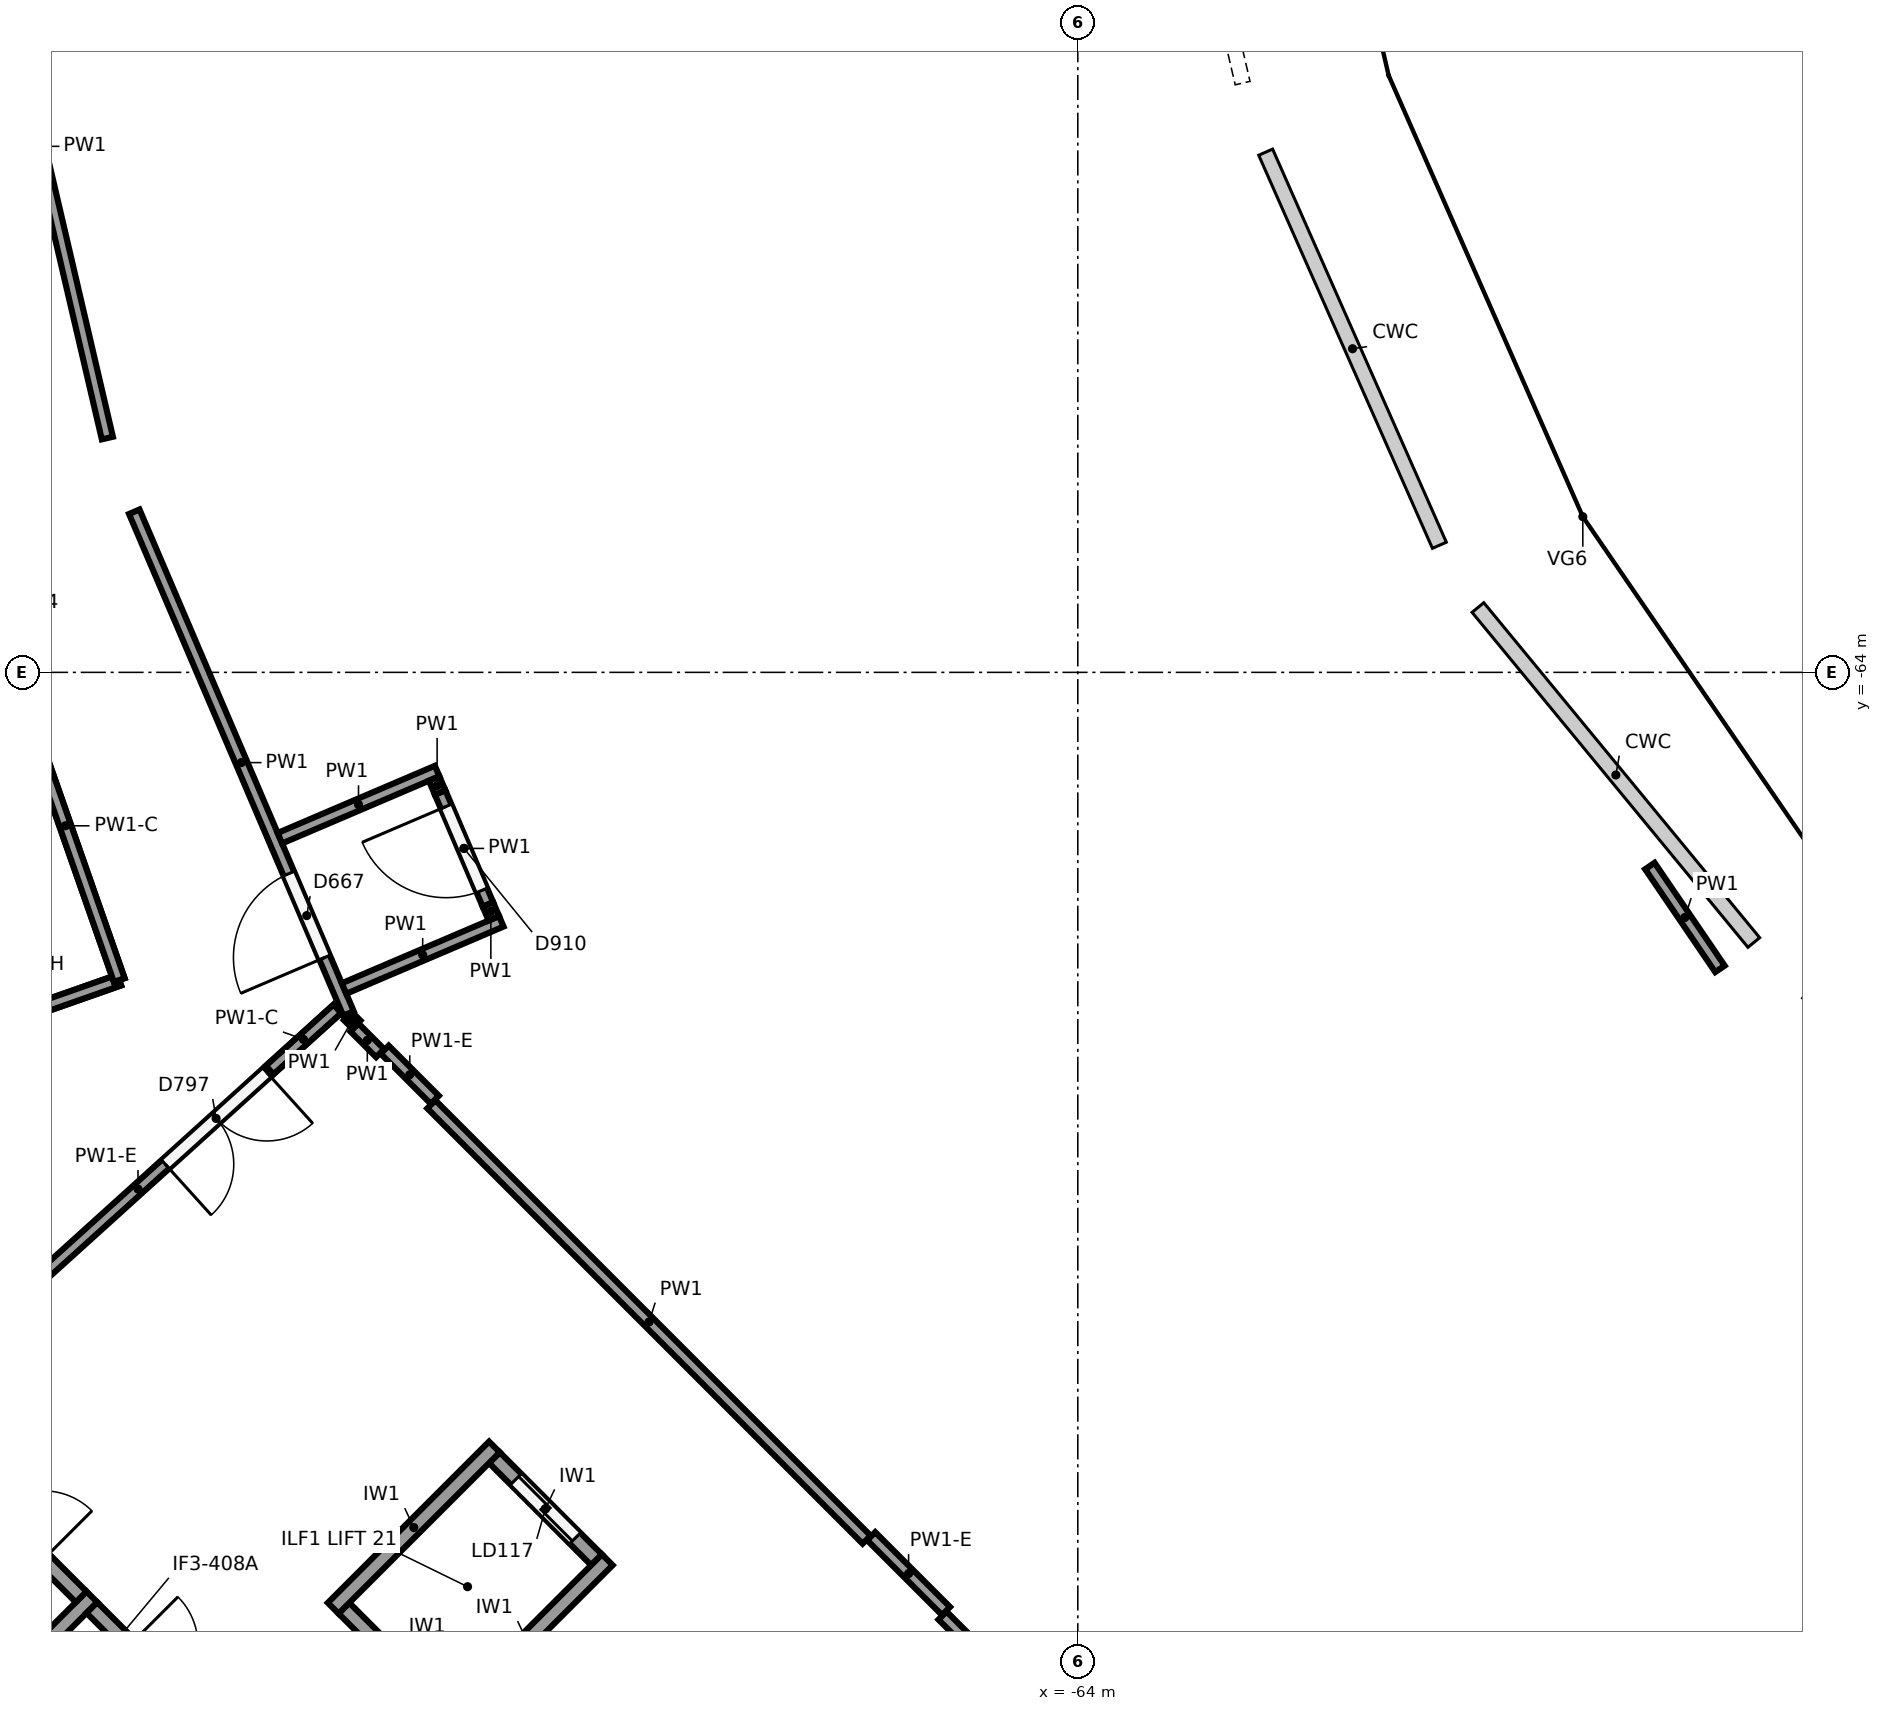
"""IFC4 building model, lengths in metres.
Left out: names, types, materials, properties, quantities, classifications, styles, units other than length and angle.
Written with IfcOpenShell. Run it as: python <this file> out.ifc"""

import sys

from ifc_helpers import new_model, si_unit, direction, frame, frame_2d, origin, origin_2d, place, context, subcontext, project, spatial, rectangle, circle, extrude, element, fill, save


model = new_model("IFC4")
c1 = context("Model", 3, precision=1e-05, world=origin(), true_north=direction((0.0, 1.0)))
c2 = subcontext(c1, "Body", "Model", "MODEL_VIEW")
j1 = project(units=[si_unit("LENGTHUNIT", "METRE"), si_unit("PLANEANGLEUNIT", "RADIAN")], contexts=[c1])
p1 = place(None, origin())
s1 = spatial("IfcSite", under=j1, at=p1, CompositionType="ELEMENT")
p2 = place(p1, origin())
s2 = spatial("IfcBuilding", under=s1, at=p2, CompositionType="ELEMENT")
p3 = place(p2, frame((0.0, 0.0, 6.5)))
s3 = spatial("IfcBuildingStorey", under=s2, at=p3, CompositionType="ELEMENT", Elevation=6.5)
p4 = place(p3, frame((-61.723, -56.716, 0.0), z_axis=(0.0, 0.0, 1.0), x_axis=(1.0, 0.0, 0.0)))
e1 = element("IfcColumn", 1, at=p4, inside=s3, PredefinedType="COLUMN", context=c2, shape_type="SweptSolid", body=[
    extrude(circle(Radius=0.45, at=origin_2d()), origin(), (0.0, 0.0, 1.0), 5.5),
])
p5 = place(p3, frame((-62.964, -57.104, 0.0), z_axis=(0.0, 0.0, 1.0), x_axis=(1.0, 0.0, 0.0)))
e2 = element("IfcColumn", 2, at=p5, inside=s3, PredefinedType="COLUMN", context=c2, shape_type="SweptSolid", body=[
    extrude(circle(Radius=0.4, at=origin_2d()), origin(), (0.0, 0.0, 1.0), 5.5),
])
p6 = place(p3, frame((-71.17, -59.677, 0.0), z_axis=(0.0, 0.0, 1.0), x_axis=(1.0, 0.0, 0.0)))
e3 = element("IfcColumn", 3, at=p6, inside=s3, PredefinedType="COLUMN", context=c2, shape_type="SweptSolid", body=[
    extrude(circle(Radius=0.45, at=origin_2d()), origin(), (0.0, 0.0, 1.0), 5.5),
])
p7 = place(p3, frame((-54.364, -60.513, 0.0), z_axis=(0.0, 0.0, 1.0), x_axis=(1.0, 0.0, 0.0)))
e4 = element("IfcColumn", 4, at=p7, inside=s3, PredefinedType="COLUMN", context=c2, shape_type="SweptSolid", body=[
    extrude(circle(Radius=0.45, at=origin_2d()), origin(), (0.0, 0.0, 1.0), 5.392),
])
p8 = place(p3, frame((-59.049, -62.766, 0.0), z_axis=(0.0, 0.0, 1.0), x_axis=(1.0, 0.0, 0.0)))
e5 = element("IfcColumn", 5, at=p8, inside=s3, PredefinedType="COLUMN", context=c2, shape_type="SweptSolid", body=[
    extrude(circle(Radius=0.45, at=origin_2d()), origin(), (0.0, 0.0, 1.0), 5.5),
])
p9 = place(p3, frame((-60.222, -63.331, 0.0), z_axis=(0.0, 0.0, 1.0), x_axis=(1.0, 0.0, 0.0)))
e6 = element("IfcColumn", 6, at=p9, inside=s3, PredefinedType="COLUMN", context=c2, shape_type="SweptSolid", body=[
    extrude(circle(Radius=0.4, at=origin_2d()), origin(), (0.0, 0.0, 1.0), 5.5),
])
for number, where, z_axis, x_axis in (
    (7, (-67.972, -67.058, 0.0), (0.0, 0.0, 1.0), (1.0, 0.0, 0.0)),
    (8, (-54.82, -67.902, 0.0), (0.0, 0.0, 1.0), (1.0, 0.0, 0.0)),
):
    element("IfcColumn", number, at=place(p3, frame(where, z_axis=z_axis, x_axis=x_axis)), inside=s3, PredefinedType="COLUMN", context=c2, shape_type="SweptSolid", body=[
        extrude(circle(Radius=0.45, at=origin_2d()), origin(), (0.0, 0.0, 1.0), 5.5),
    ])
p10 = place(p3, frame((-55.94, -68.658, 0.0), z_axis=(0.0, 0.0, 1.0), x_axis=(1.0, 0.0, 0.0)))
e9 = element("IfcColumn", 9, at=p10, inside=s3, PredefinedType="COLUMN", context=c2, shape_type="SweptSolid", body=[
    extrude(circle(Radius=0.4, at=origin_2d()), origin(), (0.0, 0.0, 1.0), 5.5),
])
p11 = place(p3, frame((-63.068, -73.47, 0.0), z_axis=(0.0, 0.0, 1.0), x_axis=(1.0, 0.0, 0.0)))
e10 = element("IfcColumn", 10, at=p11, inside=s3, PredefinedType="COLUMN", context=c2, shape_type="SweptSolid", body=[
    extrude(circle(Radius=0.45, at=origin_2d()), origin(), (0.0, 0.0, 1.0), 5.5),
])
p12 = place(p3, frame((-78.173, -77.365, 0.0), z_axis=(0.0, 0.0, 1.0), x_axis=(0.707178586901, 0.707034968179, 0.0)))
e11 = element("IfcWall", 11, at=p12, inside=s3, PredefinedType="SHEAR", context=c2, shape_type="SweptSolid", body=[
    extrude(rectangle(XDim=1.7, YDim=0.2, at=frame_2d((0.85, 0.0))), origin(), (0.0, 0.0, 1.0), 5.15),
])
p13 = place(p3, frame((-79.375, -73.9, 0.0), z_axis=(0.0, 0.0, 1.0), x_axis=(0.707068634461, -0.707144925854, 0.0)))
e12 = element("IfcWall", 12, at=p13, inside=s3, PredefinedType="SHEAR", context=c2, shape_type="SweptSolid", body=[
    extrude(rectangle(XDim=3.2, YDim=0.2, at=frame_2d((1.6, 0.0))), origin(), (0.0, 0.0, 1.0), 5.15),
])
p14 = place(p13, frame((0.7, 0.0, 0.0)))
e13 = element("IfcOpeningElement", 13, at=p14, cuts=e12, PredefinedType="OPENING", context=c2, shape_type="SweptSolid", body=[
    extrude(rectangle(XDim=1.8, YDim=2.1, at=frame_2d((0.9, 1.05))), frame((0.0, 0.11, 0.0), z_axis=(0.0, -1.0, 0.0), x_axis=(1.0, 0.0, 0.0)), (0.0, 0.0, 1.0), 0.22),
])
p15 = place(p3, frame((-76.971, -76.304, 0.0), z_axis=(0.0, 0.0, 1.0), x_axis=(0.707106781187, -0.707106781187, 0.0)))
e14 = element("IfcWall", 14, at=p15, inside=s3, PredefinedType="SHEAR", context=c2, shape_type="SweptSolid", body=[
    extrude(rectangle(XDim=3.2, YDim=0.2, at=frame_2d((1.6, 0.0))), origin(), (0.0, 0.0, 1.0), 5.15),
])
p16 = place(p15, frame((0.7, 0.0, 0.0)))
e15 = element("IfcOpeningElement", 15, at=p16, cuts=e14, PredefinedType="OPENING", context=c2, shape_type="SweptSolid", body=[
    extrude(rectangle(XDim=1.8, YDim=2.1, at=frame_2d((0.9, 1.05))), frame((0.0, 0.11, 0.0), z_axis=(0.0, -1.0, 0.0), x_axis=(1.0, 0.0, 0.0)), (0.0, 0.0, 1.0), 0.22),
])
for number, where, z_axis, x_axis in (
    (16, (-73.797, -76.312, 0.0), (0.0, 0.0, 1.0), (0.707, 0.707, 0.0)),
    (17, (-72.312, -77.797, 0.0), (0.0, 0.0, 1.0), (0.707, 0.707, 0.0)),
):
    element("IfcWall", number, at=place(p3, frame(where, z_axis=z_axis, x_axis=x_axis)), inside=s3, PredefinedType="SHEAR", context=c2, shape_type="SweptSolid", body=[
        extrude(rectangle(XDim=3.0, YDim=0.2, at=frame_2d((1.5, 0.0))), origin(), (0.0, 0.0, 1.0), 5.15),
    ])
p17 = place(p3, frame((-73.656, -76.312, 0.0), z_axis=(0.0, 0.0, 1.0), x_axis=(0.707106781187, -0.707106781187, 0.0)))
e18 = element("IfcWall", 18, at=p17, inside=s3, PredefinedType="SHEAR", context=c2, shape_type="SweptSolid", body=[
    extrude(rectangle(XDim=1.9, YDim=0.2, at=frame_2d((0.95, 0.0))), origin(), (0.0, 0.0, 1.0), 5.15),
])
p18 = place(p3, frame((-71.676, -74.332, 0.0), z_axis=(0.0, 0.0, 1.0), x_axis=(0.707106781187, -0.707106781187, 0.0)))
e19 = element("IfcWall", 19, at=p18, inside=s3, PredefinedType="SHEAR", context=c2, shape_type="SweptSolid", body=[
    extrude(rectangle(XDim=1.9, YDim=0.2, at=frame_2d((0.95, 0.0))), origin(), (0.0, 0.0, 1.0), 5.15),
])
p19 = place(p18, frame((0.4, 0.0, 0.0)))
e20 = element("IfcOpeningElement", 20, at=p19, cuts=e19, PredefinedType="OPENING", context=c2, shape_type="SweptSolid", body=[
    extrude(rectangle(XDim=1.1, YDim=2.1, at=frame_2d((0.55, 1.05))), frame((0.0, 0.11, 0.0), z_axis=(0.0, -1.0, 0.0), x_axis=(1.0, 0.0, 0.0)), (0.0, 0.0, 1.0), 0.22),
])
p20 = place(p3, frame((-76.768, -60.918, 0.0), z_axis=(0.0, 0.0, 1.0), x_axis=(-0.226944673482, 0.973907652284, 0.0)))
e21 = element("IfcWall", 21, at=p20, inside=s3, PredefinedType="PARTITIONING", context=c2, shape_type="SweptSolid", body=[
    extrude(rectangle(XDim=7.882, YDim=0.15, at=frame_2d((3.941, 0.0))), origin(), (0.0, 0.0, 1.0), 5.15),
])
p21 = place(p3, frame((-56.473, -66.547, 0.0), z_axis=(0.0, 0.0, 1.0), x_axis=(0.562994599626, -0.826460574252, 0.0)))
e22 = element("IfcWall", 22, at=p21, inside=s3, PredefinedType="PARTITIONING", context=c2, shape_type="SweptSolid", body=[
    extrude(rectangle(XDim=1.638, YDim=0.15, at=frame_2d((0.819, 0.0))), origin(), (0.0, 0.0, 1.0), 5.15),
])
p22 = place(p3, frame((-66.779, -75.41, 0.0), z_axis=(0.0, 0.0, 1.0), x_axis=(-0.707091708943, 0.707121853109, 0.0)))
e23 = element("IfcWall", 23, at=p22, inside=s3, PredefinedType="PARTITIONING", context=c2, shape_type="SweptSolid", body=[
    extrude(rectangle(XDim=8.099, YDim=0.15, at=frame_2d((4.05, 0.0))), origin(), (0.0, 0.0, 1.0), 5.15),
])
p23 = place(p3, frame((-73.179, -69.01, 0.0), z_axis=(0.0, 0.0, 1.0), x_axis=(-0.707106781187, 0.707106781187, 0.0)))
e24 = element("IfcWall", 24, at=p23, inside=s3, PredefinedType="PARTITIONING", context=c2, shape_type="SweptSolid", body=[
    extrude(rectangle(XDim=0.477, YDim=0.15, at=frame_2d((0.238, 0.0))), origin(), (0.0, 0.0, 1.0), 5.15),
])
p24 = place(p3, frame((-73.595, -68.488, 0.0), z_axis=(0.0, 0.0, 1.0), x_axis=(-0.392716080943, 0.919659763047, 0.0)))
e25 = element("IfcWall", 25, at=p24, inside=s3, PredefinedType="PARTITIONING", context=c2, shape_type="SweptSolid", body=[
    extrude(rectangle(XDim=7.177, YDim=0.15, at=frame_2d((3.589, 0.0))), origin(), (0.0, 0.0, 1.0), 5.15),
])
p25 = place(p24, frame((0.8, 0.0, 0.0)))
e26 = element("IfcOpeningElement", 26, at=p25, cuts=e25, PredefinedType="OPENING", context=c2, shape_type="SweptSolid", body=[
    extrude(rectangle(XDim=1.2, YDim=2.1, at=frame_2d((0.6, 1.05))), frame((0.0, 0.085, 0.0), z_axis=(0.0, -1.0, 0.0), x_axis=(1.0, 0.0, 0.0)), (0.0, 0.0, 1.0), 0.17),
])
p26 = place(p3, frame((-64.216, -77.973, 0.0), z_axis=(0.0, 0.0, 1.0), x_axis=(-0.707161957089, 0.707051600978, 0.0)))
e27 = element("IfcWall", 27, at=p26, inside=s3, PredefinedType="PARTITIONING", context=c2, shape_type="SweptSolid", body=[
    extrude(rectangle(XDim=2.212, YDim=0.15, at=frame_2d((1.106, 0.0))), origin(), (0.0, 0.0, 1.0), 5.15),
])
p27 = place(p3, frame((-82.605, -70.154, 0.0), z_axis=(0.0, 0.0, 1.0), x_axis=(0.943452018302, 0.331509108716, 0.0)))
e28 = element("IfcWall", 28, at=p27, inside=s3, PredefinedType="PARTITIONING", context=c2, shape_type="SweptSolid", body=[
    extrude(rectangle(XDim=6.353, YDim=0.15, at=frame_2d((3.176, 0.0))), origin(), (0.0, 0.0, 1.0), 4.25),
])
p28 = place(p27, frame((0.65, 0.0, 0.0)))
e29 = element("IfcOpeningElement", 29, at=p28, cuts=e28, PredefinedType="OPENING", context=c2, shape_type="SweptSolid", body=[
    extrude(rectangle(XDim=1.8, YDim=2.1, at=frame_2d((0.9, 1.05))), frame((0.0, 0.085, 0.0), z_axis=(0.0, -1.0, 0.0), x_axis=(1.0, 0.0, 0.0)), (0.0, 0.0, 1.0), 0.17),
])
p29 = place(p3, frame((-78.917, -68.858, 4.25), z_axis=(0.0, 0.0, 1.0), x_axis=(0.943443246904, 0.331534070454, 0.0)))
e30 = element("IfcWall", 30, at=p29, inside=s3, PredefinedType="PARTITIONING", context=c2, shape_type="SweptSolid", body=[
    extrude(rectangle(XDim=2.443, YDim=0.15, at=frame_2d((1.222, 0.0))), origin(), (0.0, 0.0, 1.0), 0.9),
])
p30 = place(p3, frame((-76.612, -68.048, 0.0), z_axis=(0.0, 0.0, 1.0), x_axis=(-0.330286915076, 0.943880582346, 0.0)))
e31 = element("IfcWall", 31, at=p30, inside=s3, PredefinedType="PARTITIONING", context=c2, shape_type="SweptSolid", body=[
    extrude(rectangle(XDim=13.87, YDim=0.15, at=frame_2d((6.935, 0.0))), origin(), (0.0, 0.0, 1.0), 4.05),
])
p31 = place(p30, frame((4.35, 0.0, 0.0)))
e32 = element("IfcOpeningElement", 32, at=p31, cuts=e31, PredefinedType="OPENING", context=c2, shape_type="SweptSolid", body=[
    extrude(rectangle(XDim=1.8, YDim=2.1, at=frame_2d((0.9, 1.05))), frame((0.0, 0.085, 0.0), z_axis=(0.0, -1.0, 0.0), x_axis=(1.0, 0.0, 0.0)), (0.0, 0.0, 1.0), 0.17),
])
p32 = place(p3, frame((-76.612, -68.048, 4.05), z_axis=(0.0, 0.0, 1.0), x_axis=(-0.330279608941, 0.94388313891, 0.0)))
e33 = element("IfcWall", 33, at=p32, inside=s3, PredefinedType="PARTITIONING", context=c2, shape_type="SweptSolid", body=[
    extrude(rectangle(XDim=4.3, YDim=0.15, at=frame_2d((2.15, 0.0))), origin(), (0.0, 0.0, 1.0), 1.1),
])
p33 = place(p3, frame((-65.734, -76.349, 0.0), z_axis=(0.0, 0.0, 1.0), x_axis=(-0.707106781187, 0.707106781187, 0.0)))
e34 = element("IfcWall", 34, at=p33, inside=s3, PredefinedType="PARTITIONING", context=c2, shape_type="SweptSolid", body=[
    extrude(rectangle(XDim=1.393, YDim=0.15, at=frame_2d((0.696, 0.0))), origin(), (0.0, 0.0, 1.0), 4.05),
])
p34 = place(p3, frame((-72.46, -69.623, 0.0), z_axis=(0.0, 0.0, 1.0), x_axis=(-0.707106781187, 0.707106781187, 0.0)))
e35 = element("IfcWall", 35, at=p34, inside=s3, PredefinedType="PARTITIONING", context=c2, shape_type="SweptSolid", body=[
    extrude(rectangle(XDim=0.933, YDim=0.15, at=frame_2d((0.466, 0.0))), origin(), (0.0, 0.0, 1.0), 4.05),
])
p35 = place(p3, frame((-73.492, -68.634, 0.0), z_axis=(0.0, 0.0, 1.0), x_axis=(-0.706331870343, 0.707880843743, 0.0)))
e36 = element("IfcWall", 36, at=p35, inside=s3, PredefinedType="PARTITIONING", context=c2, shape_type="SweptSolid", body=[
    extrude(rectangle(XDim=0.158, YDim=0.15, at=frame_2d((0.079, 0.0))), origin(), (0.0, 0.0, 1.0), 5.15),
])
p36 = place(p3, frame((-73.742, -68.427, 0.0), z_axis=(0.0, 0.0, 1.0), x_axis=(-0.741827757785, -0.670590469496, 0.0)))
e37 = element("IfcWall", 37, at=p36, inside=s3, PredefinedType="PARTITIONING", context=c2, shape_type="SweptSolid", body=[
    extrude(rectangle(XDim=7.07, YDim=0.15, at=frame_2d((3.535, 0.0))), origin(), (0.0, 0.0, 1.0), 4.05),
])
p37 = place(p36, frame((1.25, 0.0, 0.0)))
e38 = element("IfcOpeningElement", 38, at=p37, cuts=e37, PredefinedType="OPENING", context=c2, shape_type="SweptSolid", body=[
    extrude(rectangle(XDim=1.8, YDim=2.1, at=frame_2d((0.9, 1.05))), frame((0.0, 0.085, 0.0), z_axis=(0.0, -1.0, 0.0), x_axis=(1.0, 0.0, 0.0)), (0.0, 0.0, 1.0), 0.17),
])
p38 = place(p3, frame((-73.742, -68.427, 4.05), z_axis=(0.0, 0.0, 1.0), x_axis=(-0.741906759341, -0.670503065201, 0.0)))
e39 = element("IfcWall", 39, at=p38, inside=s3, PredefinedType="PARTITIONING", context=c2, shape_type="SweptSolid", body=[
    extrude(rectangle(XDim=1.2, YDim=0.15, at=frame_2d((0.6, 0.0))), origin(), (0.0, 0.0, 1.0), 1.1),
])
p39 = place(p3, frame((-73.654, -68.159, 0.0), z_axis=(0.0, 0.0, 1.0), x_axis=(0.919638165537, 0.392766653993, 0.0)))
e40 = element("IfcWall", 40, at=p39, inside=s3, PredefinedType="PARTITIONING", context=c2, shape_type="SweptSolid", body=[
    extrude(rectangle(XDim=2.25, YDim=0.15, at=frame_2d((1.125, 0.0))), origin(), (0.0, 0.0, 1.0), 5.15),
])
p40 = place(p3, frame((-74.498, -66.182, 0.0), z_axis=(0.0, 0.0, 1.0), x_axis=(0.919660619765, 0.392714074682, 0.0)))
e41 = element("IfcWall", 41, at=p40, inside=s3, PredefinedType="PARTITIONING", context=c2, shape_type="SweptSolid", body=[
    extrude(rectangle(XDim=2.25, YDim=0.15, at=frame_2d((1.125, 0.0))), origin(), (0.0, 0.0, 1.0), 5.15),
])
p41 = place(p3, frame((-71.683, -67.236, 0.0), z_axis=(0.0, 0.0, 1.0), x_axis=(-0.391709037985, 0.920089142182, 0.0)))
e42 = element("IfcWall", 42, at=p41, inside=s3, PredefinedType="PARTITIONING", context=c2, shape_type="SweptSolid", body=[
    extrude(rectangle(XDim=0.2, YDim=0.15, at=frame_2d((0.1, 0.0))), origin(), (0.0, 0.0, 1.0), 5.15),
])
p42 = place(p3, frame((-71.762, -67.052, 0.0), z_axis=(0.0, 0.0, 1.0), x_axis=(-0.392758797822, 0.919641520775, 0.0)))
e43 = element("IfcWall", 43, at=p42, inside=s3, PredefinedType="PARTITIONING", context=c2, shape_type="SweptSolid", body=[
    extrude(rectangle(XDim=1.6, YDim=0.15, at=frame_2d((0.8, 0.0))), origin(), (0.0, 0.0, 1.0), 5.15),
])
p43 = place(p42, frame((0.2, 0.0, 0.0)))
e44 = element("IfcOpeningElement", 44, at=p43, cuts=e43, PredefinedType="OPENING", context=c2, shape_type="SweptSolid", body=[
    extrude(rectangle(XDim=1.2, YDim=2.1, at=frame_2d((0.6, 1.05))), frame((0.0, 0.085, 0.0), z_axis=(0.0, -1.0, 0.0), x_axis=(1.0, 0.0, 0.0)), (0.0, 0.0, 1.0), 0.17),
])
p44 = place(p3, frame((-72.39, -65.581, 0.0), z_axis=(0.0, 0.0, 1.0), x_axis=(-0.393182323567, 0.91946052685, 0.0)))
e45 = element("IfcWall", 45, at=p44, inside=s3, PredefinedType="PARTITIONING", context=c2, shape_type="SweptSolid", body=[
    extrude(rectangle(XDim=0.2, YDim=0.15, at=frame_2d((0.1, 0.0))), origin(), (0.0, 0.0, 1.0), 5.15),
])
p45 = place(p19, origin())
e46 = element("IfcDoor", 46, at=p45, inside=s3, OperationType="SLIDING_TO_LEFT", PredefinedType="DOOR", context=c2, shape_type="SweptSolid", body=[
    extrude(rectangle(XDim=1.1, YDim=2.1, at=frame_2d((0.55, 1.05))), frame((0.0, 0.025, 0.0), z_axis=(0.0, -1.0, 0.0), x_axis=(1.0, 0.0, 0.0)), (0.0, 0.0, 1.0), 0.05),
])
fill(e20, e46)
p46 = place(p25, origin())
e47 = element("IfcDoor", 47, at=p46, inside=s3, OperationType="SINGLE_SWING_LEFT", PredefinedType="DOOR", context=c2, shape_type="SweptSolid", body=[
    extrude(rectangle(XDim=1.2, YDim=2.1, at=frame_2d((0.6, 1.05))), frame((0.0, 0.025, 0.0), z_axis=(0.0, -1.0, 0.0), x_axis=(1.0, 0.0, 0.0)), (0.0, 0.0, 1.0), 0.05),
])
fill(e26, e47)
p47 = place(p37, origin())
e48 = element("IfcDoor", 48, at=p47, inside=s3, OperationType="DOUBLE_DOOR_SINGLE_SWING", PredefinedType="DOOR", context=c2, shape_type="SweptSolid", body=[
    extrude(rectangle(XDim=1.8, YDim=2.1, at=frame_2d((0.9, 1.05))), frame((0.0, 0.025, 0.0), z_axis=(0.0, -1.0, 0.0), x_axis=(1.0, 0.0, 0.0)), (0.0, 0.0, 1.0), 0.05),
])
fill(e38, e48)
p48 = place(p43, origin())
e49 = element("IfcDoor", 49, at=p48, inside=s3, OperationType="SINGLE_SWING_RIGHT", PredefinedType="DOOR", context=c2, shape_type="SweptSolid", body=[
    extrude(rectangle(XDim=1.2, YDim=2.1, at=frame_2d((0.6, 1.05))), frame((0.0, 0.025, 0.0), z_axis=(0.0, -1.0, 0.0), x_axis=(1.0, 0.0, 0.0)), (0.0, 0.0, 1.0), 0.05),
])
fill(e44, e49)
save(model, sys.argv[1])
